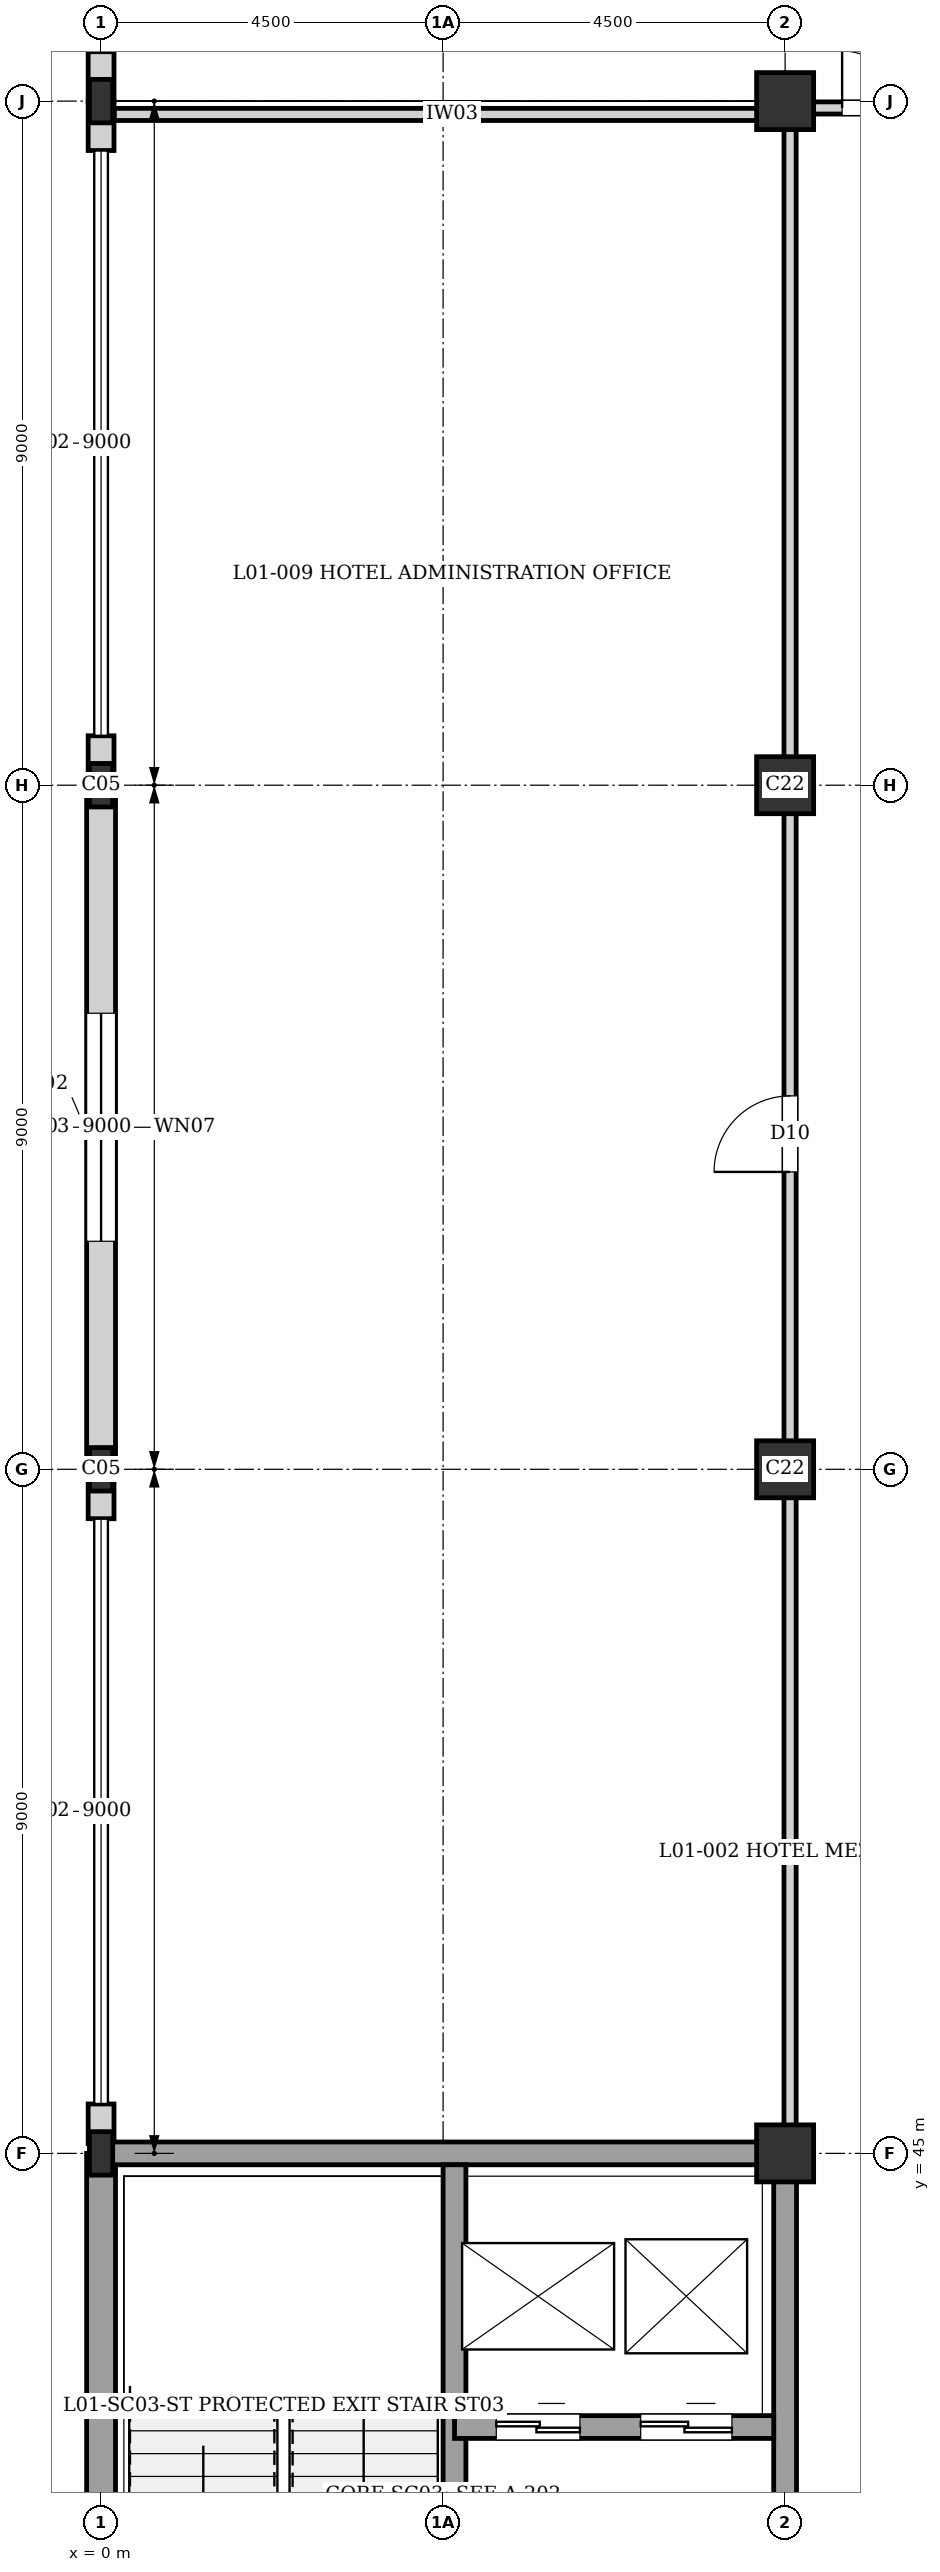
"""IFC4 building model, lengths in metres.
Left out: names, types, materials, properties, quantities, classifications, styles, units other than length and angle.
Written with IfcOpenShell. Run it as: python <this file> out.ifc"""

import sys

from ifc_helpers import new_model, si_unit, direction, frame, frame_2d, origin, origin_2d, place, context, subcontext, project, spatial, rectangle, i_section, extrude, element, fill, save


model = new_model("IFC4")
c1 = context("Model", 3, precision=1e-05, world=origin(), true_north=direction((0.0, 1.0)))
c2 = subcontext(c1, "Body", "Model", "MODEL_VIEW")
j1 = project(units=[si_unit("LENGTHUNIT", "METRE"), si_unit("PLANEANGLEUNIT", "RADIAN")], contexts=[c1])
p1 = place(None, origin())
s1 = spatial("IfcSite", under=j1, at=p1, CompositionType="ELEMENT")
p2 = place(p1, origin())
s2 = spatial("IfcBuilding", under=s1, at=p2, CompositionType="ELEMENT")
p3 = place(p2, frame((0.0, 0.0, 4.32)))
s3 = spatial("IfcBuildingStorey", under=s2, at=p3, CompositionType="ELEMENT", Elevation=4.32)
for number, where, z_axis, x_axis in (
    (1, (0.0, 45.0, 0.0), (0.0, 0.0, 1.0), (1.0, 0.0, 0.0)),
    (2, (0.0, 54.0, 0.0), (0.0, 0.0, 1.0), (1.0, 0.0, 0.0)),
    (3, (0.0, 63.0, 0.0), (0.0, 0.0, 1.0), (1.0, 0.0, 0.0)),
    (4, (0.0, 72.0, 0.0), (0.0, 0.0, 1.0), (1.0, 0.0, 0.0)),
):
    element("IfcColumn", number, at=place(p3, frame(where, z_axis=z_axis, x_axis=x_axis)), inside=s3, PredefinedType="COLUMN", context=c2, shape_type="SweptSolid", body=[
        extrude(i_section(OverallWidth=0.306, OverallDepth=0.572, WebThickness=0.021, FlangeThickness=0.04, at=origin_2d()), origin(), (0.0, 0.0, 1.0), 3.84),
    ])
for number, where, z_axis, x_axis in (
    (5, (9.0, 45.0, 0.0), (0.0, 0.0, 1.0), (1.0, 0.0, 0.0)),
    (6, (9.0, 54.0, 0.0), (0.0, 0.0, 1.0), (1.0, 0.0, 0.0)),
    (7, (9.0, 63.0, 0.0), (0.0, 0.0, 1.0), (1.0, 0.0, 0.0)),
    (8, (9.0, 72.0, 0.0), (0.0, 0.0, 1.0), (1.0, 0.0, 0.0)),
):
    element("IfcColumn", number, at=place(p3, frame(where, z_axis=z_axis, x_axis=x_axis)), inside=s3, PredefinedType="COLUMN", context=c2, shape_type="SweptSolid", body=[
        extrude(rectangle(XDim=0.75, YDim=0.75, at=origin_2d()), origin(), (0.0, 0.0, 1.0), 3.84),
    ])
p4 = place(p3, frame((0.0, 36.0, 0.0), z_axis=(0.0, 0.0, 1.0), x_axis=(0.0, 1.0, 0.0)))
e9 = element("IfcWall", 9, at=p4, inside=s3, PredefinedType="SOLIDWALL", context=c2, shape_type="SweptSolid", body=[
    extrude(rectangle(XDim=9.0, YDim=0.38, at=frame_2d((4.5, 0.0))), origin(), (0.0, 0.0, 1.0), 3.6),
])
p5 = place(p3, frame((0.0, 45.13, 0.0), z_axis=(0.0, 0.0, 1.0), x_axis=(0.0, 1.0, 0.0)))
e10 = element("IfcWall", 10, at=p5, inside=s3, PredefinedType="SOLIDWALL", context=c2, shape_type="SweptSolid", body=[
    extrude(rectangle(XDim=0.52, YDim=0.34, at=frame_2d((0.26, 0.0))), origin(), (0.0, 0.0, 1.0), 3.28),
])
p6 = place(p3, frame((0.0, 53.35, 0.0), z_axis=(0.0, 0.0, 1.0), x_axis=(0.0, 1.0, 0.0)))
e11 = element("IfcWall", 11, at=p6, inside=s3, PredefinedType="SOLIDWALL", context=c2, shape_type="SweptSolid", body=[
    extrude(rectangle(XDim=0.65, YDim=0.34, at=frame_2d((0.325, 0.0))), origin(), (0.0, 0.0, 1.0), 3.28),
])
p7 = place(p3, frame((0.0, 54.0, 0.0), z_axis=(0.0, 0.0, 1.0), x_axis=(0.0, 1.0, 0.0)))
e12 = element("IfcWall", 12, at=p7, inside=s3, PredefinedType="SOLIDWALL", context=c2, shape_type="SweptSolid", body=[
    extrude(rectangle(XDim=9.0, YDim=0.38, at=frame_2d((4.5, 0.0))), origin(), (0.0, 0.0, 1.0), 3.22),
])
p8 = place(p7, frame((3.0, 0.0, 0.4)))
e13 = element("IfcOpeningElement", 13, at=p8, cuts=e12, PredefinedType="OPENING", context=c2, shape_type="SweptSolid", body=[
    extrude(rectangle(XDim=3.0, YDim=2.2, at=frame_2d((1.5, 1.1))), frame((0.0, 0.2, 0.0), z_axis=(0.0, -1.0, 0.0), x_axis=(1.0, 0.0, 0.0)), (0.0, 0.0, 1.0), 0.4),
])
for number, where, z_axis, x_axis in (
    (14, (0.0, 63.0, 0.0), (0.0, 0.0, 1.0), (0.0, 1.0, 0.0)),
    (15, (0.0, 71.35, 0.0), (0.0, 0.0, 1.0), (0.0, 1.0, 0.0)),
):
    element("IfcWall", number, at=place(p3, frame(where, z_axis=z_axis, x_axis=x_axis)), inside=s3, PredefinedType="SOLIDWALL", context=c2, shape_type="SweptSolid", body=[
        extrude(rectangle(XDim=0.65, YDim=0.34, at=frame_2d((0.325, 0.0))), origin(), (0.0, 0.0, 1.0), 3.18),
    ])
p9 = place(p3, frame((0.0, 72.0, 0.0), z_axis=(0.0, 0.0, 1.0), x_axis=(0.0, 1.0, 0.0)))
e16 = element("IfcWall", 16, at=p9, inside=s3, PredefinedType="SOLIDWALL", context=c2, shape_type="SweptSolid", body=[
    extrude(rectangle(XDim=0.65, YDim=0.34, at=frame_2d((0.325, 0.0))), origin(), (0.0, 0.0, 1.0), 3.59),
])
p10 = place(p3, frame((9.0, 36.0, 0.0), z_axis=(0.0, 0.0, 1.0), x_axis=(0.0, 1.0, 0.0)))
e17 = element("IfcWall", 17, at=p10, inside=s3, PredefinedType="SHEAR", context=c2, shape_type="SweptSolid", body=[
    extrude(rectangle(XDim=9.0, YDim=0.3, at=frame_2d((4.5, 0.0))), origin(), (0.0, 0.0, 1.0), 3.6),
])
p11 = place(p10, frame((1.95, 0.0, 0.0)))
e18 = element("IfcOpeningElement", 18, at=p11, cuts=e17, PredefinedType="OPENING", context=c2, shape_type="SweptSolid", body=[
    extrude(rectangle(XDim=1.6, YDim=2.1, at=frame_2d((0.8, 1.05))), frame((0.0, 0.16, 0.0), z_axis=(0.0, -1.0, 0.0), x_axis=(1.0, 0.0, 0.0)), (0.0, 0.0, 1.0), 0.32),
])
p12 = place(p3, frame((0.0, 45.0, 0.0), z_axis=(0.0, 0.0, 1.0), x_axis=(1.0, 0.0, 0.0)))
e19 = element("IfcWall", 19, at=p12, inside=s3, PredefinedType="SHEAR", context=c2, shape_type="SweptSolid", body=[
    extrude(rectangle(XDim=9.0, YDim=0.3, at=frame_2d((4.5, 0.0))), origin(), (0.0, 0.0, 1.0), 3.6),
])
p13 = place(p3, frame((4.65, 36.15, 0.0), z_axis=(0.0, 0.0, 1.0), x_axis=(0.0, 1.0, 0.0)))
e20 = element("IfcWall", 20, at=p13, inside=s3, PredefinedType="SHEAR", context=c2, shape_type="SweptSolid", body=[
    extrude(rectangle(XDim=8.7, YDim=0.3, at=frame_2d((4.35, 0.0))), origin(), (0.0, 0.0, 1.0), 3.6),
])
p14 = place(p13, frame((0.35, 0.0, 0.0)))
e21 = element("IfcOpeningElement", 21, at=p14, cuts=e20, PredefinedType="OPENING", context=c2, shape_type="SweptSolid", body=[
    extrude(rectangle(XDim=1.4, YDim=2.02, at=frame_2d((0.7, 1.01))), frame((0.0, 0.16, 0.0), z_axis=(0.0, -1.0, 0.0), x_axis=(1.0, 0.0, 0.0)), (0.0, 0.0, 1.0), 0.32),
])
p15 = place(p3, frame((4.65, 41.4, 0.0), z_axis=(0.0, 0.0, 1.0), x_axis=(1.0, 0.0, 0.0)))
e22 = element("IfcWall", 22, at=p15, inside=s3, PredefinedType="SHEAR", context=c2, shape_type="SweptSolid", body=[
    extrude(rectangle(XDim=4.2, YDim=0.3, at=frame_2d((2.1, 0.0))), origin(), (0.0, 0.0, 1.0), 3.6),
])
p16 = place(p15, frame((0.55, 0.0, 0.0)))
e23 = element("IfcOpeningElement", 23, at=p16, cuts=e22, PredefinedType="OPENING", context=c2, shape_type="SweptSolid", body=[
    extrude(rectangle(XDim=1.1, YDim=2.1, at=frame_2d((0.55, 1.05))), frame((0.0, 0.16, 0.0), z_axis=(0.0, -1.0, 0.0), x_axis=(1.0, 0.0, 0.0)), (0.0, 0.0, 1.0), 0.32),
])
p17 = place(p15, frame((2.45, 0.0, 0.0)))
e24 = element("IfcOpeningElement", 24, at=p17, cuts=e22, PredefinedType="OPENING", context=c2, shape_type="SweptSolid", body=[
    extrude(rectangle(XDim=1.2, YDim=2.2, at=frame_2d((0.6, 1.1))), frame((0.0, 0.16, 0.0), z_axis=(0.0, -1.0, 0.0), x_axis=(1.0, 0.0, 0.0)), (0.0, 0.0, 1.0), 0.32),
])
p18 = place(p3, frame((0.175, 71.825, 0.0), z_axis=(0.0, 0.0, 1.0), x_axis=(1.0, 0.0, 0.0)))
e25 = element("IfcWall", 25, at=p18, inside=s3, PredefinedType="PARTITIONING", context=c2, shape_type="SweptSolid", body=[
    extrude(rectangle(XDim=8.885, YDim=0.16, at=frame_2d((4.442, 0.0))), origin(), (0.0, 0.0, 1.0), 3.59),
])
p19 = place(p3, frame((9.065, 45.155, 0.0), z_axis=(0.0, 0.0, 1.0), x_axis=(0.0, 1.0, 0.0)))
e26 = element("IfcWall", 26, at=p19, inside=s3, PredefinedType="PARTITIONING", context=c2, shape_type="SweptSolid", body=[
    extrude(rectangle(XDim=8.825, YDim=0.16, at=frame_2d((4.413, 0.0))), origin(), (0.0, 0.0, 1.0), 3.19),
])
p20 = place(p3, frame((9.22, 71.91, 0.0), z_axis=(0.0, 0.0, 1.0), x_axis=(1.0, 0.0, 0.0)))
e27 = element("IfcWall", 27, at=p20, inside=s3, PredefinedType="PARTITIONING", context=c2, shape_type="SweptSolid", body=[
    extrude(rectangle(XDim=2.56, YDim=0.16, at=frame_2d((1.28, 0.0))), origin(), (0.0, 0.0, 1.0), 3.35),
])
p21 = place(p20, frame((0.53, 0.0, 0.0)))
e28 = element("IfcOpeningElement", 28, at=p21, cuts=e27, PredefinedType="OPENING", context=c2, shape_type="SweptSolid", body=[
    extrude(rectangle(XDim=1.5, YDim=2.1, at=frame_2d((0.75, 1.05))), frame((0.0, 0.09, 0.0), z_axis=(0.0, -1.0, 0.0), x_axis=(1.0, 0.0, 0.0)), (0.0, 0.0, 1.0), 0.18),
])
p22 = place(p3, frame((9.065, 53.98, 0.0), z_axis=(0.0, 0.0, 1.0), x_axis=(0.0, 1.0, 0.0)))
e29 = element("IfcWall", 29, at=p22, inside=s3, PredefinedType="PARTITIONING", context=c2, shape_type="SweptSolid", body=[
    extrude(rectangle(XDim=9.0, YDim=0.16, at=frame_2d((4.5, 0.0))), origin(), (0.0, 0.0, 1.0), 3.14),
])
p23 = place(p22, frame((3.933, 0.0, 0.0)))
e30 = element("IfcOpeningElement", 30, at=p23, cuts=e29, PredefinedType="OPENING", context=c2, shape_type="SweptSolid", body=[
    extrude(rectangle(XDim=1.0, YDim=2.1, at=frame_2d((0.5, 1.05))), frame((0.0, 0.09, 0.0), z_axis=(0.0, -1.0, 0.0), x_axis=(1.0, 0.0, 0.0)), (0.0, 0.0, 1.0), 0.18),
])
p24 = place(p3, frame((9.065, 62.98, 0.0), z_axis=(0.0, 0.0, 1.0), x_axis=(0.0, 1.0, 0.0)))
e31 = element("IfcWall", 31, at=p24, inside=s3, PredefinedType="PARTITIONING", context=c2, shape_type="SweptSolid", body=[
    extrude(rectangle(XDim=8.69, YDim=0.16, at=frame_2d((4.345, 0.0))), origin(), (0.0, 0.0, 1.0), 3.09),
])
p25 = place(p8, origin())
e32 = element("IfcWindow", 32, at=p25, inside=s3, PartitioningType="SINGLE_PANEL", PredefinedType="WINDOW", context=c2, shape_type="SweptSolid", body=[
    extrude(rectangle(XDim=3.0, YDim=2.2, at=frame_2d((1.5, 1.1))), frame((0.0, 0.03, 0.0), z_axis=(0.0, -1.0, 0.0), x_axis=(1.0, 0.0, 0.0)), (0.0, 0.0, 1.0), 0.06),
])
fill(e13, e32)
p26 = place(p16, origin())
e33 = element("IfcDoor", 33, at=p26, inside=s3, OperationType="DOUBLE_DOOR_SLIDING", PredefinedType="DOOR", context=c2, shape_type="SweptSolid", body=[
    extrude(rectangle(XDim=1.1, YDim=2.1, at=frame_2d((0.55, 1.05))), frame((0.0, 0.025, 0.0), z_axis=(0.0, -1.0, 0.0), x_axis=(1.0, 0.0, 0.0)), (0.0, 0.0, 1.0), 0.05),
])
fill(e23, e33)
p27 = place(p17, origin())
e34 = element("IfcDoor", 34, at=p27, inside=s3, OperationType="DOUBLE_DOOR_SLIDING", PredefinedType="DOOR", context=c2, shape_type="SweptSolid", body=[
    extrude(rectangle(XDim=1.2, YDim=2.2, at=frame_2d((0.6, 1.1))), frame((0.0, 0.025, 0.0), z_axis=(0.0, -1.0, 0.0), x_axis=(1.0, 0.0, 0.0)), (0.0, 0.0, 1.0), 0.05),
])
fill(e24, e34)
p28 = place(p23, origin())
e35 = element("IfcDoor", 35, at=p28, inside=s3, OperationType="SINGLE_SWING_LEFT", PredefinedType="DOOR", context=c2, shape_type="SweptSolid", body=[
    extrude(rectangle(XDim=1.0, YDim=2.1, at=frame_2d((0.5, 1.05))), frame((0.0, 0.025, 0.0), z_axis=(0.0, -1.0, 0.0), x_axis=(1.0, 0.0, 0.0)), (0.0, 0.0, 1.0), 0.05),
])
fill(e30, e35)
p29 = place(p21, origin())
e36 = element("IfcDoor", 36, at=p29, inside=s3, OperationType="DOUBLE_DOOR_SINGLE_SWING", PredefinedType="DOOR", context=c2, shape_type="SweptSolid", body=[
    extrude(rectangle(XDim=1.5, YDim=2.1, at=frame_2d((0.75, 1.05))), frame((0.0, 0.025, 0.0), z_axis=(0.0, -1.0, 0.0), x_axis=(1.0, 0.0, 0.0)), (0.0, 0.0, 1.0), 0.05),
])
fill(e28, e36)
save(model, sys.argv[1])
